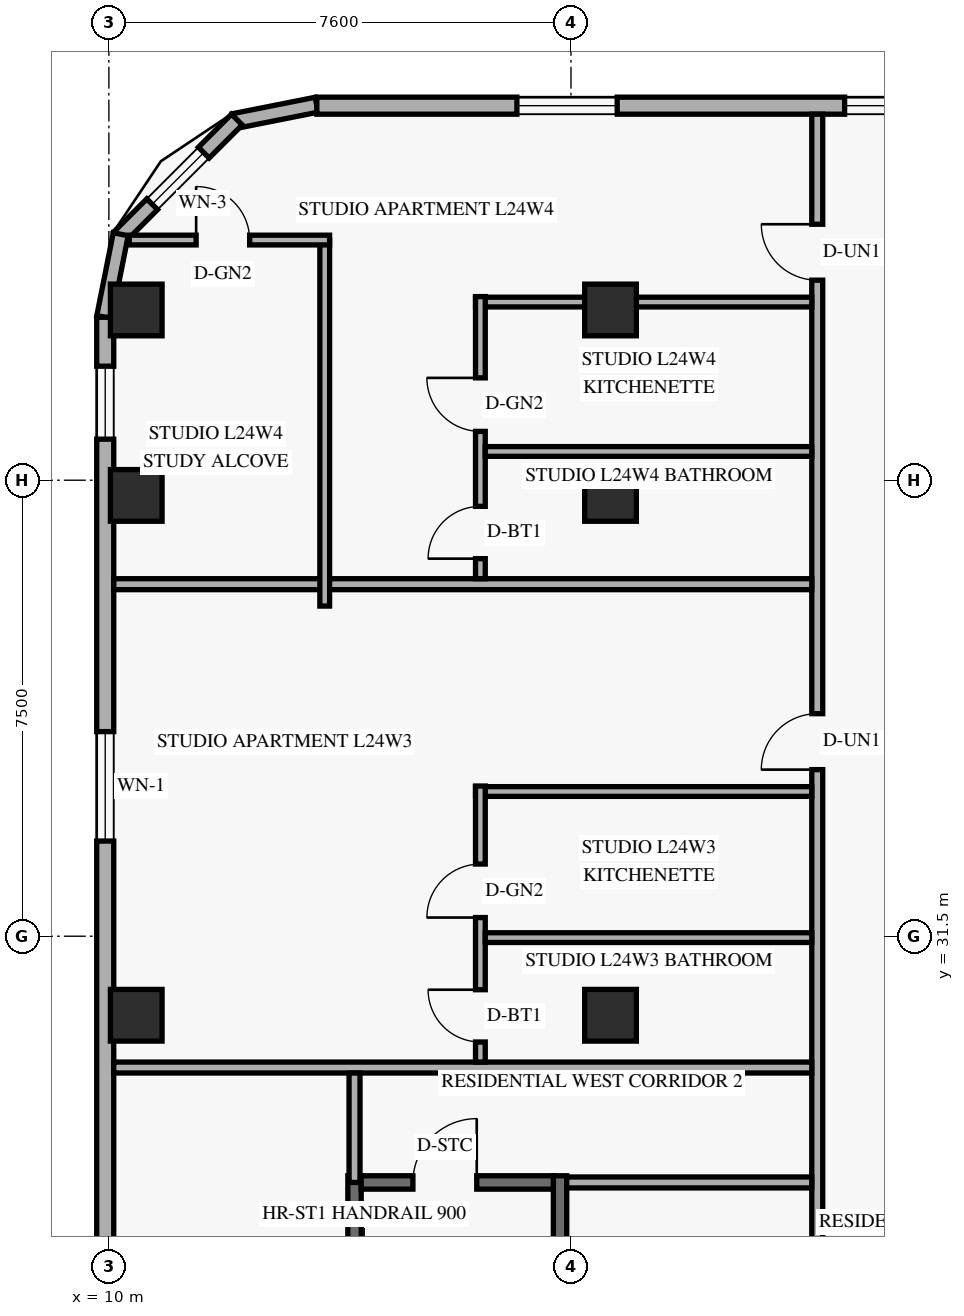
"""IFC4 building model, lengths in metres.
Left out: names, types, materials, properties, quantities, classifications, styles, units other than length and angle.
Written with IfcOpenShell. Run it as: python <this file> out.ifc"""

import sys

from ifc_helpers import new_model, si_unit, direction, frame, frame_2d, origin, origin_2d, place, context, subcontext, project, spatial, rectangle, extrude, element, fill, save


model = new_model("IFC4")
c1 = context("Model", 3, precision=1e-05, world=origin(), true_north=direction((0.0, 1.0)))
c2 = subcontext(c1, "Body", "Model", "MODEL_VIEW")
j1 = project(units=[si_unit("LENGTHUNIT", "METRE"), si_unit("PLANEANGLEUNIT", "RADIAN")], contexts=[c1])
p1 = place(None, origin())
s1 = spatial("IfcSite", under=j1, at=p1, CompositionType="ELEMENT")
p2 = place(p1, origin())
s2 = spatial("IfcBuilding", under=s1, at=p2, CompositionType="ELEMENT")
p3 = place(p2, frame((0.0, 0.0, 94.8)))
s3 = spatial("IfcBuildingStorey", under=s2, at=p3, CompositionType="ELEMENT", Elevation=94.8)
for number, where, z_axis, x_axis in (
    (1, (14.04, 19.58, 0.0), (0.0, 0.0, 1.0), (0.0, 1.0, 0.0)),
    (2, (17.42, 19.58, 0.0), (0.0, 0.0, 1.0), (0.0, 1.0, 0.0)),
):
    element("IfcWall", number, at=place(p3, frame(where, z_axis=z_axis, x_axis=x_axis)), inside=s3, PredefinedType="SHEAR", context=c2, shape_type="SweptSolid", body=[
        extrude(rectangle(XDim=7.98, YDim=0.22, at=frame_2d((3.99, 0.0))), origin(), (0.0, 0.0, 1.0), 2.739),
    ])
p4 = place(p3, frame((14.15, 27.45, 0.0), z_axis=(0.0, 0.0, 1.0), x_axis=(1.0, 0.0, 0.0)))
e3 = element("IfcWall", 3, at=p4, inside=s3, PredefinedType="SHEAR", context=c2, shape_type="SweptSolid", body=[
    extrude(rectangle(XDim=3.16, YDim=0.22, at=frame_2d((1.58, 0.0))), origin(), (0.0, 0.0, 1.0), 2.739),
])
p5 = place(p4, frame((0.85, 0.0, 0.0)))
e4 = element("IfcOpeningElement", 4, at=p5, cuts=e3, PredefinedType="OPENING", context=c2, shape_type="SweptSolid", body=[
    extrude(rectangle(XDim=1.05, YDim=2.15, at=frame_2d((0.525, 1.075))), frame((0.0, 0.12, 0.0), z_axis=(0.0, -1.0, 0.0), x_axis=(1.0, 0.0, 0.0)), (0.0, 0.0, 1.0), 0.24),
])
for number, where, z_axis, x_axis in (
    (5, (10.45, 30.2, 0.0), (0.0, 0.0, 1.0), (1.0, 0.0, 0.0)),
    (6, (10.45, 38.75, 0.0), (0.0, 0.0, 1.0), (1.0, 0.0, 0.0)),
    (7, (10.45, 41.8, 0.0), (0.0, 0.0, 1.0), (1.0, 0.0, 0.0)),
    (8, (18.25, 30.2, 0.0), (0.0, 0.0, 1.0), (1.0, 0.0, 0.0)),
    (9, (18.25, 38.75, 0.0), (0.0, 0.0, 1.0), (1.0, 0.0, 0.0)),
    (10, (18.25, 41.8, 0.0), (0.0, 0.0, 1.0), (1.0, 0.0, 0.0)),
):
    element("IfcColumn", number, at=place(p3, frame(where, z_axis=z_axis, x_axis=x_axis)), inside=s3, PredefinedType="COLUMN", context=c2, shape_type="SweptSolid", body=[
        extrude(rectangle(XDim=0.85, YDim=0.85, at=origin_2d()), origin(), (0.0, 0.0, 1.0), 3.6),
    ])
p6 = place(p3, frame((13.417, 45.176, 0.0), z_axis=(0.0, 0.0, 1.0), x_axis=(-0.980809899341, -0.19496651342, 0.0)))
e11 = element("IfcWall", 11, at=p6, inside=s3, PredefinedType="SOLIDWALL", context=c2, shape_type="SweptSolid", body=[
    extrude(rectangle(XDim=1.389, YDim=0.25, at=frame_2d((0.694, 0.0))), origin(), (0.0, 0.0, 1.0), 3.35),
])
p7 = place(p3, frame((12.105, 44.932, 0.0), z_axis=(0.0, 0.0, 1.0), x_axis=(-0.707151344399, -0.707062215165, 0.0)))
e12 = element("IfcWall", 12, at=p7, inside=s3, PredefinedType="SOLIDWALL", context=c2, shape_type="SweptSolid", body=[
    extrude(rectangle(XDim=2.739, YDim=0.25, at=frame_2d((1.37, 0.0))), origin(), (0.0, 0.0, 1.0), 3.35),
])
p8 = place(p7, frame((0.77, 0.0, 0.85)))
e13 = element("IfcOpeningElement", 13, at=p8, cuts=e12, PredefinedType="OPENING", context=c2, shape_type="SweptSolid", body=[
    extrude(rectangle(XDim=1.2, YDim=1.5, at=frame_2d((0.6, 0.75))), frame((0.0, 0.135, 0.0), z_axis=(0.0, -1.0, 0.0), x_axis=(1.0, 0.0, 0.0)), (0.0, 0.0, 1.0), 0.27),
])
p9 = place(p3, frame((10.195, 43.045, 0.0), z_axis=(0.0, 0.0, 1.0), x_axis=(-0.195000137217, -0.980803214965, 0.0)))
e14 = element("IfcWall", 14, at=p9, inside=s3, PredefinedType="SOLIDWALL", context=c2, shape_type="SweptSolid", body=[
    extrude(rectangle(XDim=1.388, YDim=0.25, at=frame_2d((0.694, 0.0))), origin(), (0.0, 0.0, 1.0), 3.35),
])
p10 = place(p3, frame((49.98, 45.16, 0.0), z_axis=(0.0, 0.0, 1.0), x_axis=(-1.0, 0.0, 0.0)))
e15 = element("IfcWall", 15, at=p10, inside=s3, PredefinedType="SOLIDWALL", context=c2, shape_type="SweptSolid", body=[
    extrude(rectangle(XDim=36.56, YDim=0.28, at=frame_2d((18.28, 0.0))), origin(), (0.0, 0.0, 1.0), 3.35),
])
p11 = place(p10, frame((31.62, 0.0, 0.85)))
e16 = element("IfcOpeningElement", 16, at=p11, cuts=e15, PredefinedType="OPENING", context=c2, shape_type="SweptSolid", body=[
    extrude(rectangle(XDim=1.65, YDim=1.6, at=frame_2d((0.825, 0.8))), frame((0.0, 0.15, 0.0), z_axis=(0.0, -1.0, 0.0), x_axis=(1.0, 0.0, 0.0)), (0.0, 0.0, 1.0), 0.3),
])
p12 = place(p10, frame((26.68, 0.0, 0.85)))
e17 = element("IfcOpeningElement", 17, at=p12, cuts=e15, PredefinedType="OPENING", context=c2, shape_type="SweptSolid", body=[
    extrude(rectangle(XDim=1.2, YDim=1.5, at=frame_2d((0.6, 0.75))), frame((0.0, 0.15, 0.0), z_axis=(0.0, -1.0, 0.0), x_axis=(1.0, 0.0, 0.0)), (0.0, 0.0, 1.0), 0.3),
])
p13 = place(p10, frame((22.312, 0.0, 0.85)))
e18 = element("IfcOpeningElement", 18, at=p13, cuts=e15, PredefinedType="OPENING", context=c2, shape_type="SweptSolid", body=[
    extrude(rectangle(XDim=1.65, YDim=1.6, at=frame_2d((0.825, 0.8))), frame((0.0, 0.15, 0.0), z_axis=(0.0, -1.0, 0.0), x_axis=(1.0, 0.0, 0.0)), (0.0, 0.0, 1.0), 0.3),
])
p14 = place(p10, frame((16.477, 0.0, 0.85)))
e19 = element("IfcOpeningElement", 19, at=p14, cuts=e15, PredefinedType="OPENING", context=c2, shape_type="SweptSolid", body=[
    extrude(rectangle(XDim=1.65, YDim=1.6, at=frame_2d((0.825, 0.8))), frame((0.0, 0.15, 0.0), z_axis=(0.0, -1.0, 0.0), x_axis=(1.0, 0.0, 0.0)), (0.0, 0.0, 1.0), 0.3),
])
p15 = place(p10, frame((12.895, 0.0, 0.85)))
e20 = element("IfcOpeningElement", 20, at=p15, cuts=e15, PredefinedType="OPENING", context=c2, shape_type="SweptSolid", body=[
    extrude(rectangle(XDim=1.2, YDim=1.5, at=frame_2d((0.6, 0.75))), frame((0.0, 0.15, 0.0), z_axis=(0.0, -1.0, 0.0), x_axis=(1.0, 0.0, 0.0)), (0.0, 0.0, 1.0), 0.3),
])
p16 = place(p10, frame((8.092, 0.0, 0.85)))
e21 = element("IfcOpeningElement", 21, at=p16, cuts=e15, PredefinedType="OPENING", context=c2, shape_type="SweptSolid", body=[
    extrude(rectangle(XDim=1.65, YDim=1.6, at=frame_2d((0.825, 0.8))), frame((0.0, 0.15, 0.0), z_axis=(0.0, -1.0, 0.0), x_axis=(1.0, 0.0, 0.0)), (0.0, 0.0, 1.0), 0.3),
])
p17 = place(p10, frame((1.877, 0.0, 0.85)))
e22 = element("IfcOpeningElement", 22, at=p17, cuts=e15, PredefinedType="OPENING", context=c2, shape_type="SweptSolid", body=[
    extrude(rectangle(XDim=1.65, YDim=1.6, at=frame_2d((0.825, 0.8))), frame((0.0, 0.15, 0.0), z_axis=(0.0, -1.0, 0.0), x_axis=(1.0, 0.0, 0.0)), (0.0, 0.0, 1.0), 0.3),
])
p18 = place(p3, frame((9.94, 41.68, 0.0), z_axis=(0.0, 0.0, 1.0), x_axis=(0.0, -1.0, 0.0)))
e23 = element("IfcWall", 23, at=p18, inside=s3, PredefinedType="SOLIDWALL", context=c2, shape_type="SweptSolid", body=[
    extrude(rectangle(XDim=35.36, YDim=0.28, at=frame_2d((17.68, 0.0))), origin(), (0.0, 0.0, 1.0), 3.35),
])
p19 = place(p18, frame((33.355, 0.0, 0.85)))
e24 = element("IfcOpeningElement", 24, at=p19, cuts=e23, PredefinedType="OPENING", context=c2, shape_type="SweptSolid", body=[
    extrude(rectangle(XDim=1.2, YDim=1.5, at=frame_2d((0.6, 0.75))), frame((0.0, 0.15, 0.0), z_axis=(0.0, -1.0, 0.0), x_axis=(1.0, 0.0, 0.0)), (0.0, 0.0, 1.0), 0.3),
])
p20 = place(p18, frame((26.617, 0.0, 0.85)))
e25 = element("IfcOpeningElement", 25, at=p20, cuts=e23, PredefinedType="OPENING", context=c2, shape_type="SweptSolid", body=[
    extrude(rectangle(XDim=1.8, YDim=1.6, at=frame_2d((0.9, 0.8))), frame((0.0, 0.15, 0.0), z_axis=(0.0, -1.0, 0.0), x_axis=(1.0, 0.0, 0.0)), (0.0, 0.0, 1.0), 0.3),
])
p21 = place(p18, frame((16.265, 0.0, 0.85)))
e26 = element("IfcOpeningElement", 26, at=p21, cuts=e23, PredefinedType="OPENING", context=c2, shape_type="SweptSolid", body=[
    extrude(rectangle(XDim=1.8, YDim=1.6, at=frame_2d((0.9, 0.8))), frame((0.0, 0.15, 0.0), z_axis=(0.0, -1.0, 0.0), x_axis=(1.0, 0.0, 0.0)), (0.0, 0.0, 1.0), 0.3),
])
p22 = place(p18, frame((6.815, 0.0, 0.85)))
e27 = element("IfcOpeningElement", 27, at=p22, cuts=e23, PredefinedType="OPENING", context=c2, shape_type="SweptSolid", body=[
    extrude(rectangle(XDim=1.8, YDim=1.6, at=frame_2d((0.9, 0.8))), frame((0.0, 0.15, 0.0), z_axis=(0.0, -1.0, 0.0), x_axis=(1.0, 0.0, 0.0)), (0.0, 0.0, 1.0), 0.3),
])
p23 = place(p18, frame((0.805, 0.0, 0.85)))
e28 = element("IfcOpeningElement", 28, at=p23, cuts=e23, PredefinedType="OPENING", context=c2, shape_type="SweptSolid", body=[
    extrude(rectangle(XDim=1.2, YDim=1.5, at=frame_2d((0.6, 0.75))), frame((0.0, 0.15, 0.0), z_axis=(0.0, -1.0, 0.0), x_axis=(1.0, 0.0, 0.0)), (0.0, 0.0, 1.0), 0.3),
])
p24 = place(p3, frame((21.65, 2.98, 0.0), z_axis=(0.0, 0.0, 1.0), x_axis=(0.0, 1.0, 0.0)))
e29 = element("IfcWall", 29, at=p24, inside=s3, PredefinedType="STANDARD", context=c2, shape_type="SweptSolid", body=[
    extrude(rectangle(XDim=42.04, YDim=0.18, at=frame_2d((21.02, 0.0))), origin(), (0.0, 0.0, 1.0), 2.721),
])
p25 = place(p24, frame((2.295, 0.0, 0.0)))
e30 = element("IfcOpeningElement", 30, at=p25, cuts=e29, PredefinedType="OPENING", context=c2, shape_type="SweptSolid", body=[
    extrude(rectangle(XDim=0.92, YDim=2.15, at=frame_2d((0.46, 1.075))), frame((0.0, 0.1, 0.0), z_axis=(0.0, -1.0, 0.0), x_axis=(1.0, 0.0, 0.0)), (0.0, 0.0, 1.0), 0.2),
])
p26 = place(p24, frame((13.135, 0.0, 0.0)))
e31 = element("IfcOpeningElement", 31, at=p26, cuts=e29, PredefinedType="OPENING", context=c2, shape_type="SweptSolid", body=[
    extrude(rectangle(XDim=0.92, YDim=2.15, at=frame_2d((0.46, 1.075))), frame((0.0, 0.1, 0.0), z_axis=(0.0, -1.0, 0.0), x_axis=(1.0, 0.0, 0.0)), (0.0, 0.0, 1.0), 0.2),
])
p27 = place(p24, frame((19.22, 0.0, 0.0)))
e32 = element("IfcOpeningElement", 32, at=p27, cuts=e29, PredefinedType="OPENING", context=c2, shape_type="SweptSolid", body=[
    extrude(rectangle(XDim=0.95, YDim=2.15, at=frame_2d((0.475, 1.075))), frame((0.0, 0.1, 0.0), z_axis=(0.0, -1.0, 0.0), x_axis=(1.0, 0.0, 0.0)), (0.0, 0.0, 1.0), 0.2),
])
p28 = place(p24, frame((31.26, 0.0, 0.0)))
e33 = element("IfcOpeningElement", 33, at=p28, cuts=e29, PredefinedType="OPENING", context=c2, shape_type="SweptSolid", body=[
    extrude(rectangle(XDim=0.92, YDim=2.15, at=frame_2d((0.46, 1.075))), frame((0.0, 0.1, 0.0), z_axis=(0.0, -1.0, 0.0), x_axis=(1.0, 0.0, 0.0)), (0.0, 0.0, 1.0), 0.2),
])
p29 = place(p24, frame((39.31, 0.0, 0.0)))
e34 = element("IfcOpeningElement", 34, at=p29, cuts=e29, PredefinedType="OPENING", context=c2, shape_type="SweptSolid", body=[
    extrude(rectangle(XDim=0.92, YDim=2.15, at=frame_2d((0.46, 1.075))), frame((0.0, 0.1, 0.0), z_axis=(0.0, -1.0, 0.0), x_axis=(1.0, 0.0, 0.0)), (0.0, 0.0, 1.0), 0.2),
])
p30 = place(p3, frame((17.53, 27.45, 0.0), z_axis=(0.0, 0.0, 1.0), x_axis=(1.0, 0.0, 0.0)))
e35 = element("IfcWall", 35, at=p30, inside=s3, PredefinedType="STANDARD", context=c2, shape_type="SweptSolid", body=[
    extrude(rectangle(XDim=4.03, YDim=0.18, at=frame_2d((2.015, 0.0))), origin(), (0.0, 0.0, 1.0), 2.721),
])
p31 = place(p3, frame((10.08, 29.34, 0.0), z_axis=(0.0, 0.0, 1.0), x_axis=(1.0, 0.0, 0.0)))
e36 = element("IfcWall", 36, at=p31, inside=s3, PredefinedType="STANDARD", context=c2, shape_type="SweptSolid", body=[
    extrude(rectangle(XDim=11.48, YDim=0.18, at=frame_2d((5.74, 0.0))), origin(), (0.0, 0.0, 1.0), 2.721),
])
p32 = place(p3, frame((14.04, 27.45, 0.0), z_axis=(0.0, 0.0, 1.0), x_axis=(0.0, 1.0, 0.0)))
e37 = element("IfcWall", 37, at=p32, inside=s3, PredefinedType="STANDARD", context=c2, shape_type="SweptSolid", body=[
    extrude(rectangle(XDim=1.8, YDim=0.18, at=frame_2d((0.9, 0.0))), origin(), (0.0, 0.0, 1.0), 2.721),
])
p33 = place(p3, frame((10.08, 37.29, 0.0), z_axis=(0.0, 0.0, 1.0), x_axis=(1.0, 0.0, 0.0)))
e38 = element("IfcWall", 38, at=p33, inside=s3, PredefinedType="PARTITIONING", context=c2, shape_type="SweptSolid", body=[
    extrude(rectangle(XDim=11.48, YDim=0.18, at=frame_2d((5.74, 0.0))), origin(), (0.0, 0.0, 1.0), 2.721),
])
p34 = place(p3, frame((16.03, 33.88, 0.0), z_axis=(0.0, 0.0, 1.0), x_axis=(1.0, 0.0, 0.0)))
e39 = element("IfcWall", 39, at=p34, inside=s3, PredefinedType="PLUMBINGWALL", context=c2, shape_type="SweptSolid", body=[
    extrude(rectangle(XDim=5.53, YDim=0.16, at=frame_2d((2.765, 0.0))), origin(), (0.0, 0.0, 1.0), 2.721),
])
p35 = place(p3, frame((16.11, 29.43, 0.0), z_axis=(0.0, 0.0, 1.0), x_axis=(0.0, 1.0, 0.0)))
e40 = element("IfcWall", 40, at=p35, inside=s3, PredefinedType="PLUMBINGWALL", context=c2, shape_type="SweptSolid", body=[
    extrude(rectangle(XDim=4.54, YDim=0.16, at=frame_2d((2.27, 0.0))), origin(), (0.0, 0.0, 1.0), 2.721),
])
p36 = place(p35, frame((0.33, 0.0, 0.0)))
e41 = element("IfcOpeningElement", 41, at=p36, cuts=e40, PredefinedType="OPENING", context=c2, shape_type="SweptSolid", body=[
    extrude(rectangle(XDim=0.86, YDim=2.12, at=frame_2d((0.43, 1.06))), frame((0.0, 0.09, 0.0), z_axis=(0.0, -1.0, 0.0), x_axis=(1.0, 0.0, 0.0)), (0.0, 0.0, 1.0), 0.18),
])
p37 = place(p35, frame((2.377, 0.0, 0.0)))
e42 = element("IfcOpeningElement", 42, at=p37, cuts=e40, PredefinedType="OPENING", context=c2, shape_type="SweptSolid", body=[
    extrude(rectangle(XDim=0.88, YDim=2.12, at=frame_2d((0.44, 1.06))), frame((0.0, 0.09, 0.0), z_axis=(0.0, -1.0, 0.0), x_axis=(1.0, 0.0, 0.0)), (0.0, 0.0, 1.0), 0.18),
])
p38 = place(p3, frame((16.19, 31.477, 0.0), z_axis=(0.0, 0.0, 1.0), x_axis=(1.0, 0.0, 0.0)))
e43 = element("IfcWall", 43, at=p38, inside=s3, PredefinedType="PLUMBINGWALL", context=c2, shape_type="SweptSolid", body=[
    extrude(rectangle(XDim=5.37, YDim=0.16, at=frame_2d((2.685, 0.0))), origin(), (0.0, 0.0, 1.0), 2.721),
])
p39 = place(p3, frame((16.03, 41.93, 0.0), z_axis=(0.0, 0.0, 1.0), x_axis=(1.0, 0.0, 0.0)))
e44 = element("IfcWall", 44, at=p39, inside=s3, PredefinedType="PLUMBINGWALL", context=c2, shape_type="SweptSolid", body=[
    extrude(rectangle(XDim=5.53, YDim=0.16, at=frame_2d((2.765, 0.0))), origin(), (0.0, 0.0, 1.0), 2.799),
])
p40 = place(p3, frame((16.11, 37.38, 0.0), z_axis=(0.0, 0.0, 1.0), x_axis=(0.0, 1.0, 0.0)))
e45 = element("IfcWall", 45, at=p40, inside=s3, PredefinedType="PLUMBINGWALL", context=c2, shape_type="SweptSolid", body=[
    extrude(rectangle(XDim=4.64, YDim=0.16, at=frame_2d((2.32, 0.0))), origin(), (0.0, 0.0, 1.0), 2.721),
])
p41 = place(p40, frame((0.33, 0.0, 0.0)))
e46 = element("IfcOpeningElement", 46, at=p41, cuts=e45, PredefinedType="OPENING", context=c2, shape_type="SweptSolid", body=[
    extrude(rectangle(XDim=0.86, YDim=2.12, at=frame_2d((0.43, 1.06))), frame((0.0, 0.09, 0.0), z_axis=(0.0, -1.0, 0.0), x_axis=(1.0, 0.0, 0.0)), (0.0, 0.0, 1.0), 0.18),
])
p42 = place(p40, frame((2.423, 0.0, 0.0)))
e47 = element("IfcOpeningElement", 47, at=p42, cuts=e45, PredefinedType="OPENING", context=c2, shape_type="SweptSolid", body=[
    extrude(rectangle(XDim=0.88, YDim=2.12, at=frame_2d((0.44, 1.06))), frame((0.0, 0.09, 0.0), z_axis=(0.0, -1.0, 0.0), x_axis=(1.0, 0.0, 0.0)), (0.0, 0.0, 1.0), 0.18),
])
p43 = place(p3, frame((16.19, 39.473, 0.0), z_axis=(0.0, 0.0, 1.0), x_axis=(1.0, 0.0, 0.0)))
e48 = element("IfcWall", 48, at=p43, inside=s3, PredefinedType="PLUMBINGWALL", context=c2, shape_type="SweptSolid", body=[
    extrude(rectangle(XDim=5.37, YDim=0.16, at=frame_2d((2.685, 0.0))), origin(), (0.0, 0.0, 1.0), 2.721),
])
p44 = place(p3, frame((13.55, 36.93, 0.0), z_axis=(0.0, 0.0, 1.0), x_axis=(0.0, 1.0, 0.0)))
e49 = element("IfcWall", 49, at=p44, inside=s3, PredefinedType="PARTITIONING", context=c2, shape_type="SweptSolid", body=[
    extrude(rectangle(XDim=6.02, YDim=0.16, at=frame_2d((3.01, 0.0))), origin(), (0.0, 0.0, 1.0), 2.721),
])
p45 = place(p3, frame((10.335, 42.95, 0.0), z_axis=(0.0, 0.0, 1.0), x_axis=(1.0, 0.0, 0.0)))
e50 = element("IfcWall", 50, at=p45, inside=s3, PredefinedType="PARTITIONING", context=c2, shape_type="SweptSolid", body=[
    extrude(rectangle(XDim=3.295, YDim=0.16, at=frame_2d((1.647, 0.0))), origin(), (0.0, 0.0, 1.0), 3.35),
])
p46 = place(p45, frame((1.1, 0.0, 0.0)))
e51 = element("IfcOpeningElement", 51, at=p46, cuts=e50, PredefinedType="OPENING", context=c2, shape_type="SweptSolid", body=[
    extrude(rectangle(XDim=0.88, YDim=2.12, at=frame_2d((0.44, 1.06))), frame((0.0, 0.09, 0.0), z_axis=(0.0, -1.0, 0.0), x_axis=(1.0, 0.0, 0.0)), (0.0, 0.0, 1.0), 0.18),
])
p47 = place(p8, origin())
e52 = element("IfcWindow", 52, at=p47, inside=s3, PartitioningType="SINGLE_PANEL", PredefinedType="WINDOW", context=c2, shape_type="SweptSolid", body=[
    extrude(rectangle(XDim=1.2, YDim=1.5, at=frame_2d((0.6, 0.75))), frame((0.0, 0.03, 0.0), z_axis=(0.0, -1.0, 0.0), x_axis=(1.0, 0.0, 0.0)), (0.0, 0.0, 1.0), 0.06),
])
fill(e13, e52)
p48 = place(p11, origin())
e53 = element("IfcWindow", 53, at=p48, inside=s3, PartitioningType="SINGLE_PANEL", PredefinedType="WINDOW", context=c2, shape_type="SweptSolid", body=[
    extrude(rectangle(XDim=1.65, YDim=1.6, at=frame_2d((0.825, 0.8))), frame((0.0, 0.03, 0.0), z_axis=(0.0, -1.0, 0.0), x_axis=(1.0, 0.0, 0.0)), (0.0, 0.0, 1.0), 0.06),
])
fill(e16, e53)
p49 = place(p12, origin())
e54 = element("IfcWindow", 54, at=p49, inside=s3, PartitioningType="SINGLE_PANEL", PredefinedType="WINDOW", context=c2, shape_type="SweptSolid", body=[
    extrude(rectangle(XDim=1.2, YDim=1.5, at=frame_2d((0.6, 0.75))), frame((0.0, 0.03, 0.0), z_axis=(0.0, -1.0, 0.0), x_axis=(1.0, 0.0, 0.0)), (0.0, 0.0, 1.0), 0.06),
])
fill(e17, e54)
p50 = place(p22, origin())
e55 = element("IfcWindow", 55, at=p50, inside=s3, PartitioningType="SINGLE_PANEL", PredefinedType="WINDOW", context=c2, shape_type="SweptSolid", body=[
    extrude(rectangle(XDim=1.8, YDim=1.6, at=frame_2d((0.9, 0.8))), frame((0.0, 0.03, 0.0), z_axis=(0.0, -1.0, 0.0), x_axis=(1.0, 0.0, 0.0)), (0.0, 0.0, 1.0), 0.06),
])
fill(e27, e55)
p51 = place(p23, origin())
e56 = element("IfcWindow", 56, at=p51, inside=s3, PartitioningType="SINGLE_PANEL", PredefinedType="WINDOW", context=c2, shape_type="SweptSolid", body=[
    extrude(rectangle(XDim=1.2, YDim=1.5, at=frame_2d((0.6, 0.75))), frame((0.0, 0.03, 0.0), z_axis=(0.0, -1.0, 0.0), x_axis=(1.0, 0.0, 0.0)), (0.0, 0.0, 1.0), 0.06),
])
fill(e28, e56)
p52 = place(p5, frame((1.05, 0.0, 0.0), z_axis=(0.0, 0.0, 1.0), x_axis=(-1.0, 0.0, 0.0)))
e57 = element("IfcDoor", 57, at=p52, inside=s3, OperationType="SINGLE_SWING_LEFT", PredefinedType="DOOR", context=c2, shape_type="SweptSolid", body=[
    extrude(rectangle(XDim=1.05, YDim=2.15, at=frame_2d((0.525, 1.075))), frame((0.0, 0.025, 0.0), z_axis=(0.0, -1.0, 0.0), x_axis=(1.0, 0.0, 0.0)), (0.0, 0.0, 1.0), 0.05),
])
fill(e4, e57)
p53 = place(p28, origin())
e58 = element("IfcDoor", 58, at=p53, inside=s3, OperationType="SINGLE_SWING_LEFT", PredefinedType="DOOR", context=c2, shape_type="SweptSolid", body=[
    extrude(rectangle(XDim=0.92, YDim=2.15, at=frame_2d((0.46, 1.075))), frame((0.0, 0.025, 0.0), z_axis=(0.0, -1.0, 0.0), x_axis=(1.0, 0.0, 0.0)), (0.0, 0.0, 1.0), 0.05),
])
fill(e33, e58)
p54 = place(p36, origin())
e59 = element("IfcDoor", 59, at=p54, inside=s3, OperationType="SINGLE_SWING_RIGHT", PredefinedType="DOOR", context=c2, shape_type="SweptSolid", body=[
    extrude(rectangle(XDim=0.86, YDim=2.12, at=frame_2d((0.43, 1.06))), frame((0.0, 0.025, 0.0), z_axis=(0.0, -1.0, 0.0), x_axis=(1.0, 0.0, 0.0)), (0.0, 0.0, 1.0), 0.05),
])
fill(e41, e59)
p55 = place(p37, origin())
e60 = element("IfcDoor", 60, at=p55, inside=s3, OperationType="SINGLE_SWING_LEFT", PredefinedType="DOOR", context=c2, shape_type="SweptSolid", body=[
    extrude(rectangle(XDim=0.88, YDim=2.12, at=frame_2d((0.44, 1.06))), frame((0.0, 0.025, 0.0), z_axis=(0.0, -1.0, 0.0), x_axis=(1.0, 0.0, 0.0)), (0.0, 0.0, 1.0), 0.05),
])
fill(e42, e60)
p56 = place(p46, origin())
e61 = element("IfcDoor", 61, at=p56, inside=s3, OperationType="SINGLE_SWING_LEFT", PredefinedType="DOOR", context=c2, shape_type="SweptSolid", body=[
    extrude(rectangle(XDim=0.88, YDim=2.12, at=frame_2d((0.44, 1.06))), frame((0.0, 0.025, 0.0), z_axis=(0.0, -1.0, 0.0), x_axis=(1.0, 0.0, 0.0)), (0.0, 0.0, 1.0), 0.05),
])
fill(e51, e61)
p57 = place(p29, origin())
e62 = element("IfcDoor", 62, at=p57, inside=s3, OperationType="SINGLE_SWING_RIGHT", PredefinedType="DOOR", context=c2, shape_type="SweptSolid", body=[
    extrude(rectangle(XDim=0.92, YDim=2.15, at=frame_2d((0.46, 1.075))), frame((0.0, 0.025, 0.0), z_axis=(0.0, -1.0, 0.0), x_axis=(1.0, 0.0, 0.0)), (0.0, 0.0, 1.0), 0.05),
])
fill(e34, e62)
p58 = place(p41, origin())
e63 = element("IfcDoor", 63, at=p58, inside=s3, OperationType="SINGLE_SWING_LEFT", PredefinedType="DOOR", context=c2, shape_type="SweptSolid", body=[
    extrude(rectangle(XDim=0.86, YDim=2.12, at=frame_2d((0.43, 1.06))), frame((0.0, 0.025, 0.0), z_axis=(0.0, -1.0, 0.0), x_axis=(1.0, 0.0, 0.0)), (0.0, 0.0, 1.0), 0.05),
])
fill(e46, e63)
p59 = place(p42, origin())
e64 = element("IfcDoor", 64, at=p59, inside=s3, OperationType="SINGLE_SWING_RIGHT", PredefinedType="DOOR", context=c2, shape_type="SweptSolid", body=[
    extrude(rectangle(XDim=0.88, YDim=2.12, at=frame_2d((0.44, 1.06))), frame((0.0, 0.025, 0.0), z_axis=(0.0, -1.0, 0.0), x_axis=(1.0, 0.0, 0.0)), (0.0, 0.0, 1.0), 0.05),
])
fill(e47, e64)
save(model, sys.argv[1])
